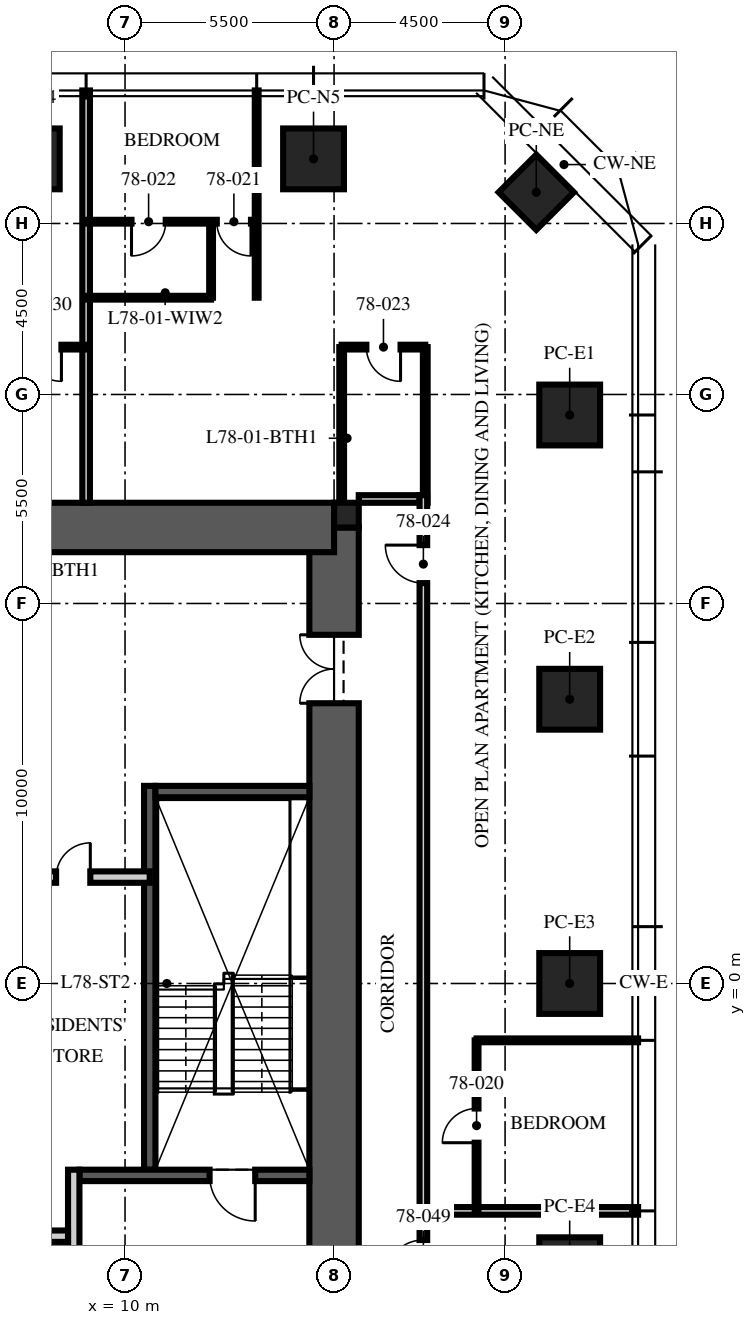
"""IFC4 building model, lengths in metres.
Left out: names, types, materials, properties, quantities, classifications, styles, units other than length and angle.
Written with IfcOpenShell. Run it as: python <this file> out.ifc"""

import sys

from ifc_helpers import new_model, si_unit, direction, frame, frame_2d, origin, origin_2d, place, context, subcontext, project, spatial, rectangle, extrude, element, fill, save


model = new_model("IFC4")
c1 = context("Model", 3, precision=1e-05, world=origin(), true_north=direction((0.0, 1.0)))
c2 = subcontext(c1, "Body", "Model", "MODEL_VIEW")
j1 = project(units=[si_unit("LENGTHUNIT", "METRE"), si_unit("PLANEANGLEUNIT", "RADIAN")], contexts=[c1])
p1 = place(None, origin())
s1 = spatial("IfcSite", under=j1, at=p1, CompositionType="ELEMENT")
p2 = place(p1, origin())
s2 = spatial("IfcBuilding", under=s1, at=p2, CompositionType="ELEMENT")
p3 = place(p2, frame((0.0, 0.0, 312.0)))
s3 = spatial("IfcBuildingStorey", under=s2, at=p3, CompositionType="ELEMENT", Elevation=312.0)
p4 = place(p3, frame((15.5, -12.0, -0.25), z_axis=(0.0, 0.0, 1.0), x_axis=(0.0, 1.0, 0.0)))
e1 = element("IfcWall", 1, at=p4, inside=s3, PredefinedType="SHEAR", context=c2, shape_type="SweptSolid", body=[
    extrude(rectangle(XDim=24.0, YDim=1.3, at=frame_2d((12.0, 0.0))), origin(), (0.0, 0.0, 1.0), 3.75),
])
p5 = place(p4, frame((3.125, 0.0, 0.25)))
e2 = element("IfcOpeningElement", 2, at=p5, cuts=e1, PredefinedType="OPENING", context=c2, shape_type="SweptSolid", body=[
    extrude(rectangle(XDim=1.2, YDim=2.1, at=frame_2d((0.6, 1.05))), frame((0.0, 0.66, 0.0), z_axis=(0.0, -1.0, 0.0), x_axis=(1.0, 0.0, 0.0)), (0.0, 0.0, 1.0), 1.32),
])
p6 = place(p4, frame((19.375, 0.0, 0.25)))
e3 = element("IfcOpeningElement", 3, at=p6, cuts=e1, PredefinedType="OPENING", context=c2, shape_type="SweptSolid", body=[
    extrude(rectangle(XDim=1.8, YDim=2.1, at=frame_2d((0.9, 1.05))), frame((0.0, 0.66, 0.0), z_axis=(0.0, -1.0, 0.0), x_axis=(1.0, 0.0, 0.0)), (0.0, 0.0, 1.0), 1.32),
])
p7 = place(p3, frame((-15.5, 12.0, -0.25), z_axis=(0.0, 0.0, 1.0), x_axis=(1.0, 0.0, 0.0)))
e4 = element("IfcWall", 4, at=p7, inside=s3, PredefinedType="SHEAR", context=c2, shape_type="SweptSolid", body=[
    extrude(rectangle(XDim=31.0, YDim=1.3, at=frame_2d((15.5, 0.0))), origin(), (0.0, 0.0, 1.0), 3.75),
])
p8 = place(p3, frame((15.825, 12.325, -0.25), z_axis=(0.0, 0.0, 1.0), x_axis=(1.0, 0.0, 0.0)))
e5 = element("IfcColumn", 5, at=p8, inside=s3, PredefinedType="COLUMN", context=c2, shape_type="SweptSolid", body=[
    extrude(rectangle(XDim=0.65, YDim=0.65, at=origin_2d()), origin(), (0.0, 0.0, 1.0), 3.75),
])
for number, where, z_axis, x_axis in (
    (6, (7.48, 21.7, 0.0), (0.0, 0.0, 1.0), (1.0, 0.0, 0.0)),
    (7, (14.96, 21.7, 0.0), (0.0, 0.0, 1.0), (1.0, 0.0, 0.0)),
    (8, (21.7, 14.96, 0.0), (0.0, 0.0, 1.0), (0.0, 1.0, 0.0)),
    (9, (21.7, 7.48, 0.0), (0.0, 0.0, 1.0), (0.0, 1.0, 0.0)),
    (10, (21.7, 0.0, 0.0), (0.0, 0.0, 1.0), (0.0, 1.0, 0.0)),
    (11, (21.7, -7.48, 0.0), (0.0, 0.0, 1.0), (0.0, 1.0, 0.0)),
):
    element("IfcColumn", number, at=place(p3, frame(where, z_axis=z_axis, x_axis=x_axis)), inside=s3, PredefinedType="COLUMN", context=c2, shape_type="SweptSolid", body=[
        extrude(rectangle(XDim=1.6, YDim=1.6, at=origin_2d()), origin(), (0.0, 0.0, 1.0), 3.75),
    ])
p9 = place(p3, frame((20.821, 20.821, 0.0), z_axis=(0.0, 0.0, 1.0), x_axis=(0.707106781187, -0.707106781187, 0.0)))
e12 = element("IfcColumn", 12, at=p9, inside=s3, PredefinedType="COLUMN", context=c2, shape_type="SweptSolid", body=[
    extrude(rectangle(XDim=1.4, YDim=1.4, at=origin_2d()), origin(), (0.0, 0.0, 1.0), 3.75),
])
p10 = place(p3, frame((10.65, -4.9, 0.0), z_axis=(0.0, 0.0, 1.0), x_axis=(0.0, 1.0, 0.0)))
e13 = element("IfcWall", 13, at=p10, inside=s3, PredefinedType="SOLIDWALL", context=c2, shape_type="SweptSolid", body=[
    extrude(rectangle(XDim=10.1, YDim=0.3, at=frame_2d((5.05, 0.0))), origin(), (0.0, 0.0, 1.0), 3.5),
])
p11 = place(p3, frame((14.85, -5.05, 0.0), z_axis=(0.0, 0.0, 1.0), x_axis=(-1.0, 0.0, 0.0)))
e14 = element("IfcWall", 14, at=p11, inside=s3, PredefinedType="SOLIDWALL", context=c2, shape_type="SweptSolid", body=[
    extrude(rectangle(XDim=6.05, YDim=0.3, at=frame_2d((3.025, 0.0))), origin(), (0.0, 0.0, 1.0), 3.5),
])
p12 = place(p11, frame((1.425, 0.0, 0.0)))
e15 = element("IfcOpeningElement", 15, at=p12, cuts=e14, PredefinedType="OPENING", context=c2, shape_type="SweptSolid", body=[
    extrude(rectangle(XDim=1.2, YDim=2.1, at=frame_2d((0.6, 1.05))), frame((0.0, 0.16, 0.0), z_axis=(0.0, -1.0, 0.0), x_axis=(1.0, 0.0, 0.0)), (0.0, 0.0, 1.0), 0.32),
])
p13 = place(p3, frame((14.85, 5.05, 0.0), z_axis=(0.0, 0.0, 1.0), x_axis=(-1.0, 0.0, 0.0)))
e16 = element("IfcWall", 16, at=p13, inside=s3, PredefinedType="SOLIDWALL", context=c2, shape_type="SweptSolid", body=[
    extrude(rectangle(XDim=4.05, YDim=0.3, at=frame_2d((2.025, 0.0))), origin(), (0.0, 0.0, 1.0), 3.5),
])
p14 = place(p3, frame((8.65, -11.35, 0.0), z_axis=(0.0, 0.0, 1.0), x_axis=(0.0, 1.0, 0.0)))
e17 = element("IfcWall", 17, at=p14, inside=s3, PredefinedType="PARTITIONING", context=c2, shape_type="SweptSolid", body=[
    extrude(rectangle(XDim=6.45, YDim=0.3, at=frame_2d((3.225, 0.0))), origin(), (0.0, 0.0, 1.0), 3.5),
])
p15 = place(p14, frame((2.6, 0.0, 0.0)))
e18 = element("IfcOpeningElement", 18, at=p15, cuts=e17, PredefinedType="OPENING", context=c2, shape_type="SweptSolid", body=[
    extrude(rectangle(XDim=1.1, YDim=2.1, at=frame_2d((0.55, 1.05))), frame((0.0, 0.16, 0.0), z_axis=(0.0, -1.0, 0.0), x_axis=(1.0, 0.0, 0.0)), (0.0, 0.0, 1.0), 0.32),
])
p16 = place(p3, frame((-8.5, -6.65, 0.0), z_axis=(0.0, 0.0, 1.0), x_axis=(1.0, 0.0, 0.0)))
e19 = element("IfcWall", 19, at=p16, inside=s3, PredefinedType="PARTITIONING", context=c2, shape_type="SweptSolid", body=[
    extrude(rectangle(XDim=17.0, YDim=0.3, at=frame_2d((8.5, 0.0))), origin(), (0.0, 0.0, 1.0), 3.5),
])
p17 = place(p16, frame((7.8, 0.0, 0.0)))
e20 = element("IfcOpeningElement", 20, at=p17, cuts=e19, PredefinedType="OPENING", context=c2, shape_type="SweptSolid", body=[
    extrude(rectangle(XDim=1.3, YDim=2.4, at=frame_2d((0.65, 1.2))), frame((0.0, 0.16, 0.0), z_axis=(0.0, -1.0, 0.0), x_axis=(1.0, 0.0, 0.0)), (0.0, 0.0, 1.0), 0.32),
])
p18 = place(p16, frame((5.65, 0.0, 0.0)))
e21 = element("IfcOpeningElement", 21, at=p18, cuts=e19, PredefinedType="OPENING", context=c2, shape_type="SweptSolid", body=[
    extrude(rectangle(XDim=0.9, YDim=2.1, at=frame_2d((0.45, 1.05))), frame((0.0, 0.16, 0.0), z_axis=(0.0, -1.0, 0.0), x_axis=(1.0, 0.0, 0.0)), (0.0, 0.0, 1.0), 0.32),
])
p19 = place(p16, frame((10.4, 0.0, 0.0)))
e22 = element("IfcOpeningElement", 22, at=p19, cuts=e19, PredefinedType="OPENING", context=c2, shape_type="SweptSolid", body=[
    extrude(rectangle(XDim=0.9, YDim=2.1, at=frame_2d((0.45, 1.05))), frame((0.0, 0.16, 0.0), z_axis=(0.0, -1.0, 0.0), x_axis=(1.0, 0.0, 0.0)), (0.0, 0.0, 1.0), 0.32),
])
p20 = place(p3, frame((-10.65, 2.8, 0.0), z_axis=(0.0, 0.0, 1.0), x_axis=(1.0, 0.0, 0.0)))
e23 = element("IfcWall", 23, at=p20, inside=s3, PredefinedType="PARTITIONING", context=c2, shape_type="SweptSolid", body=[
    extrude(rectangle(XDim=21.3, YDim=0.3, at=frame_2d((10.65, 0.0))), origin(), (0.0, 0.0, 1.0), 3.5),
])
p21 = place(p20, frame((10.05, 0.0, 0.0)))
e24 = element("IfcOpeningElement", 24, at=p21, cuts=e23, PredefinedType="OPENING", context=c2, shape_type="SweptSolid", body=[
    extrude(rectangle(XDim=1.2, YDim=2.1, at=frame_2d((0.6, 1.05))), frame((0.0, 0.16, 0.0), z_axis=(0.0, -1.0, 0.0), x_axis=(1.0, 0.0, 0.0)), (0.0, 0.0, 1.0), 0.32),
])
p22 = place(p20, frame((1.493, 0.0, 0.0)))
e25 = element("IfcOpeningElement", 25, at=p22, cuts=e23, PredefinedType="OPENING", context=c2, shape_type="SweptSolid", body=[
    extrude(rectangle(XDim=0.9, YDim=2.1, at=frame_2d((0.45, 1.05))), frame((0.0, 0.16, 0.0), z_axis=(0.0, -1.0, 0.0), x_axis=(1.0, 0.0, 0.0)), (0.0, 0.0, 1.0), 0.32),
])
p23 = place(p20, frame((18.836, 0.0, 0.0)))
e26 = element("IfcOpeningElement", 26, at=p23, cuts=e23, PredefinedType="OPENING", context=c2, shape_type="SweptSolid", body=[
    extrude(rectangle(XDim=0.9, YDim=2.1, at=frame_2d((0.45, 1.05))), frame((0.0, 0.16, 0.0), z_axis=(0.0, -1.0, 0.0), x_axis=(1.0, 0.0, 0.0)), (0.0, 0.0, 1.0), 0.32),
])
p24 = place(p3, frame((16.15, 12.75, 0.0), z_axis=(0.0, 0.0, 1.0), x_axis=(1.0, 0.0, 0.0)))
e27 = element("IfcWall", 27, at=p24, inside=s3, PredefinedType="PARTITIONING", context=c2, shape_type="SweptSolid", body=[
    extrude(rectangle(XDim=1.6, YDim=0.2, at=frame_2d((0.8, 0.0))), origin(), (0.0, 0.0, 1.0), 2.6),
])
p25 = place(p3, frame((17.95, -5.984, 0.0), z_axis=(0.0, 0.0, 1.0), x_axis=(1.0, 0.0, 0.0)))
e28 = element("IfcWall", 28, at=p25, inside=s3, PredefinedType="PARTITIONING", context=c2, shape_type="SweptSolid", body=[
    extrude(rectangle(XDim=5.55, YDim=0.2, at=frame_2d((2.775, 0.0))), origin(), (0.0, 0.0, 1.0), 3.01),
])
p26 = place(p3, frame((19.25, -1.496, 0.0), z_axis=(0.0, 0.0, 1.0), x_axis=(1.0, 0.0, 0.0)))
e29 = element("IfcWall", 29, at=p26, inside=s3, PredefinedType="PARTITIONING", context=c2, shape_type="SweptSolid", body=[
    extrude(rectangle(XDim=4.25, YDim=0.1, at=frame_2d((2.125, 0.0))), origin(), (0.0, 0.0, 1.0), 3.01),
])
p27 = place(p3, frame((13.464, 18.046, 0.0), z_axis=(0.0, 0.0, 1.0), x_axis=(0.0, 1.0, 0.0)))
e30 = element("IfcWall", 30, at=p27, inside=s3, PredefinedType="PARTITIONING", context=c2, shape_type="SweptSolid", body=[
    extrude(rectangle(XDim=5.454, YDim=0.1, at=frame_2d((2.727, 0.0))), origin(), (0.0, 0.0, 1.0), 3.01),
])
p28 = place(p3, frame((8.976, 12.65, 0.0), z_axis=(0.0, 0.0, 1.0), x_axis=(0.0, 1.0, 0.0)))
e31 = element("IfcWall", 31, at=p28, inside=s3, PredefinedType="PARTITIONING", context=c2, shape_type="SweptSolid", body=[
    extrude(rectangle(XDim=10.85, YDim=0.2, at=frame_2d((5.425, 0.0))), origin(), (0.0, 0.0, 1.0), 3.01),
])
p29 = place(p3, frame((19.25, -5.984, 0.0), z_axis=(0.0, 0.0, 1.0), x_axis=(0.0, 1.0, 0.0)))
e32 = element("IfcWall", 32, at=p29, inside=s3, PredefinedType="PARTITIONING", context=c2, shape_type="SweptSolid", body=[
    extrude(rectangle(XDim=4.488, YDim=0.1, at=frame_2d((2.244, 0.0))), origin(), (0.0, 0.0, 1.0), 2.91),
])
p30 = place(p29, frame((1.794, 0.0, 0.0)))
e33 = element("IfcOpeningElement", 33, at=p30, cuts=e32, PredefinedType="OPENING", context=c2, shape_type="SweptSolid", body=[
    extrude(rectangle(XDim=0.9, YDim=2.1, at=frame_2d((0.45, 1.05))), frame((0.0, 0.06, 0.0), z_axis=(0.0, -1.0, 0.0), x_axis=(1.0, 0.0, 0.0)), (0.0, 0.0, 1.0), 0.12),
])
p31 = place(p3, frame((13.464, 20.046, 0.0), z_axis=(0.0, 0.0, 1.0), x_axis=(-1.0, 0.0, 0.0)))
e34 = element("IfcWall", 34, at=p31, inside=s3, PredefinedType="PARTITIONING", context=c2, shape_type="SweptSolid", body=[
    extrude(rectangle(XDim=4.488, YDim=0.1, at=frame_2d((2.244, 0.0))), origin(), (0.0, 0.0, 1.0), 2.91),
])
p32 = place(p31, frame((0.15, 0.0, 0.0)))
e35 = element("IfcOpeningElement", 35, at=p32, cuts=e34, PredefinedType="OPENING", context=c2, shape_type="SweptSolid", body=[
    extrude(rectangle(XDim=0.9, YDim=2.1, at=frame_2d((0.45, 1.05))), frame((0.0, 0.06, 0.0), z_axis=(0.0, -1.0, 0.0), x_axis=(1.0, 0.0, 0.0)), (0.0, 0.0, 1.0), 0.12),
])
p33 = place(p31, frame((2.394, 0.0, 0.0)))
e36 = element("IfcOpeningElement", 36, at=p33, cuts=e34, PredefinedType="OPENING", context=c2, shape_type="SweptSolid", body=[
    extrude(rectangle(XDim=0.9, YDim=2.1, at=frame_2d((0.45, 1.05))), frame((0.0, 0.06, 0.0), z_axis=(0.0, -1.0, 0.0), x_axis=(1.0, 0.0, 0.0)), (0.0, 0.0, 1.0), 0.12),
])
p34 = place(p3, frame((12.264, 18.046, 0.0), z_axis=(0.0, 0.0, 1.0), x_axis=(0.0, 1.0, 0.0)))
e37 = element("IfcWall", 37, at=p34, inside=s3, PredefinedType="PARTITIONING", context=c2, shape_type="SweptSolid", body=[
    extrude(rectangle(XDim=2.0, YDim=0.1, at=frame_2d((1.0, 0.0))), origin(), (0.0, 0.0, 1.0), 3.5),
])
p35 = place(p3, frame((12.264, 18.046, 0.0), z_axis=(0.0, 0.0, 1.0), x_axis=(-1.0, 0.0, 0.0)))
e38 = element("IfcWall", 38, at=p35, inside=s3, PredefinedType="PARTITIONING", context=c2, shape_type="SweptSolid", body=[
    extrude(rectangle(XDim=3.288, YDim=0.1, at=frame_2d((1.644, 0.0))), origin(), (0.0, 0.0, 1.0), 2.91),
])
p36 = place(p3, frame((17.9, 16.746, 0.0), z_axis=(0.0, 0.0, 1.0), x_axis=(-1.0, 0.0, 0.0)))
e39 = element("IfcWall", 39, at=p36, inside=s3, PredefinedType="PARTITIONING", context=c2, shape_type="SweptSolid", body=[
    extrude(rectangle(XDim=2.2, YDim=0.125, at=frame_2d((1.1, 0.0))), origin(), (0.0, 0.0, 1.0), 2.91),
])
p37 = place(p36, frame((0.65, 0.0, 0.0)))
e40 = element("IfcOpeningElement", 40, at=p37, cuts=e39, PredefinedType="OPENING", context=c2, shape_type="SweptSolid", body=[
    extrude(rectangle(XDim=0.9, YDim=2.1, at=frame_2d((0.45, 1.05))), frame((0.0, 0.073, 0.0), z_axis=(0.0, -1.0, 0.0), x_axis=(1.0, 0.0, 0.0)), (0.0, 0.0, 1.0), 0.145),
])
for number, where, z_axis, x_axis in (
    (41, (17.9, 12.65, 0.0), (0.0, 0.0, 1.0), (0.0, 1.0, 0.0)),
    (42, (15.7, 12.65, 0.0), (0.0, 0.0, 1.0), (0.0, 1.0, 0.0)),
):
    element("IfcWall", number, at=place(p3, frame(where, z_axis=z_axis, x_axis=x_axis)), inside=s3, PredefinedType="PARTITIONING", context=c2, shape_type="SweptSolid", body=[
        extrude(rectangle(XDim=4.096, YDim=0.125, at=frame_2d((2.048, 0.0))), origin(), (0.0, 0.0, 1.0), 2.6),
    ])
p38 = place(p3, frame((8.976, 16.746, 0.0), z_axis=(0.0, 0.0, 1.0), x_axis=(-1.0, 0.0, 0.0)))
e43 = element("IfcWall", 43, at=p38, inside=s3, PredefinedType="PARTITIONING", context=c2, shape_type="SweptSolid", body=[
    extrude(rectangle(XDim=7.7, YDim=0.125, at=frame_2d((3.85, 0.0))), origin(), (0.0, 0.0, 1.0), 2.9),
])
p39 = place(p38, frame((0.65, 0.0, 0.0)))
e44 = element("IfcOpeningElement", 44, at=p39, cuts=e43, PredefinedType="OPENING", context=c2, shape_type="SweptSolid", body=[
    extrude(rectangle(XDim=0.9, YDim=2.1, at=frame_2d((0.45, 1.05))), frame((0.0, 0.073, 0.0), z_axis=(0.0, -1.0, 0.0), x_axis=(1.0, 0.0, 0.0)), (0.0, 0.0, 1.0), 0.145),
])
p40 = place(p38, frame((2.85, 0.0, 0.0)))
e45 = element("IfcOpeningElement", 45, at=p40, cuts=e43, PredefinedType="OPENING", context=c2, shape_type="SweptSolid", body=[
    extrude(rectangle(XDim=0.9, YDim=2.1, at=frame_2d((0.45, 1.05))), frame((0.0, 0.073, 0.0), z_axis=(0.0, -1.0, 0.0), x_axis=(1.0, 0.0, 0.0)), (0.0, 0.0, 1.0), 0.145),
])
p41 = place(p38, frame((4.85, 0.0, 0.0)))
e46 = element("IfcOpeningElement", 46, at=p41, cuts=e43, PredefinedType="OPENING", context=c2, shape_type="SweptSolid", body=[
    extrude(rectangle(XDim=0.9, YDim=2.1, at=frame_2d((0.45, 1.05))), frame((0.0, 0.073, 0.0), z_axis=(0.0, -1.0, 0.0), x_axis=(1.0, 0.0, 0.0)), (0.0, 0.0, 1.0), 0.145),
])
p42 = place(p38, frame((6.5, 0.0, 0.0)))
e47 = element("IfcOpeningElement", 47, at=p42, cuts=e43, PredefinedType="OPENING", context=c2, shape_type="SweptSolid", body=[
    extrude(rectangle(XDim=0.9, YDim=2.1, at=frame_2d((0.45, 1.05))), frame((0.0, 0.073, 0.0), z_axis=(0.0, -1.0, 0.0), x_axis=(1.0, 0.0, 0.0)), (0.0, 0.0, 1.0), 0.145),
])
p43 = place(p3, frame((17.85, -12.85, 0.0), z_axis=(0.0, 0.0, 1.0), x_axis=(0.0, 1.0, 0.0)))
e48 = element("IfcWall", 48, at=p43, inside=s3, PredefinedType="PARTITIONING", context=c2, shape_type="SweptSolid", body=[
    extrude(rectangle(XDim=25.7, YDim=0.2, at=frame_2d((12.85, 0.0))), origin(), (0.0, 0.0, 1.0), 2.9),
])
p44 = place(p43, frame((23.386, 0.0, 0.0)))
e49 = element("IfcOpeningElement", 49, at=p44, cuts=e48, PredefinedType="OPENING", context=c2, shape_type="SweptSolid", body=[
    extrude(rectangle(XDim=1.0, YDim=2.2, at=frame_2d((0.5, 1.1))), frame((0.0, 0.11, 0.0), z_axis=(0.0, -1.0, 0.0), x_axis=(1.0, 0.0, 0.0)), (0.0, 0.0, 1.0), 0.22),
])
p45 = place(p43, frame((5.1, 0.0, 0.0)))
e50 = element("IfcOpeningElement", 50, at=p45, cuts=e48, PredefinedType="OPENING", context=c2, shape_type="SweptSolid", body=[
    extrude(rectangle(XDim=1.0, YDim=2.2, at=frame_2d((0.5, 1.1))), frame((0.0, 0.11, 0.0), z_axis=(0.0, -1.0, 0.0), x_axis=(1.0, 0.0, 0.0)), (0.0, 0.0, 1.0), 0.22),
])
p46 = place(p12, origin())
e51 = element("IfcDoor", 51, at=p46, inside=s3, OperationType="SINGLE_SWING_LEFT", PredefinedType="DOOR", context=c2, shape_type="SweptSolid", body=[
    extrude(rectangle(XDim=1.2, YDim=2.1, at=frame_2d((0.6, 1.05))), frame((0.0, 0.025, 0.0), z_axis=(0.0, -1.0, 0.0), x_axis=(1.0, 0.0, 0.0)), (0.0, 0.0, 1.0), 0.05),
])
fill(e15, e51)
p47 = place(p6, origin())
e52 = element("IfcDoor", 52, at=p47, inside=s3, OperationType="DOUBLE_DOOR_SINGLE_SWING", PredefinedType="DOOR", context=c2, shape_type="SweptSolid", body=[
    extrude(rectangle(XDim=1.8, YDim=2.1, at=frame_2d((0.9, 1.05))), frame((0.0, 0.025, 0.0), z_axis=(0.0, -1.0, 0.0), x_axis=(1.0, 0.0, 0.0)), (0.0, 0.0, 1.0), 0.05),
])
fill(e3, e52)
p48 = place(p23, origin())
e53 = element("IfcDoor", 53, at=p48, inside=s3, OperationType="SINGLE_SWING_RIGHT", PredefinedType="DOOR", context=c2, shape_type="SweptSolid", body=[
    extrude(rectangle(XDim=0.9, YDim=2.1, at=frame_2d((0.45, 1.05))), frame((0.0, 0.025, 0.0), z_axis=(0.0, -1.0, 0.0), x_axis=(1.0, 0.0, 0.0)), (0.0, 0.0, 1.0), 0.05),
])
fill(e26, e53)
p49 = place(p30, origin())
e54 = element("IfcDoor", 54, at=p49, inside=s3, OperationType="SINGLE_SWING_LEFT", PredefinedType="DOOR", context=c2, shape_type="SweptSolid", body=[
    extrude(rectangle(XDim=0.9, YDim=2.1, at=frame_2d((0.45, 1.05))), frame((0.0, 0.025, 0.0), z_axis=(0.0, -1.0, 0.0), x_axis=(1.0, 0.0, 0.0)), (0.0, 0.0, 1.0), 0.05),
])
fill(e33, e54)
p50 = place(p32, origin())
e55 = element("IfcDoor", 55, at=p50, inside=s3, OperationType="SINGLE_SWING_LEFT", PredefinedType="DOOR", context=c2, shape_type="SweptSolid", body=[
    extrude(rectangle(XDim=0.9, YDim=2.1, at=frame_2d((0.45, 1.05))), frame((0.0, 0.025, 0.0), z_axis=(0.0, -1.0, 0.0), x_axis=(1.0, 0.0, 0.0)), (0.0, 0.0, 1.0), 0.05),
])
fill(e35, e55)
p51 = place(p33, origin())
e56 = element("IfcDoor", 56, at=p51, inside=s3, OperationType="SINGLE_SWING_RIGHT", PredefinedType="DOOR", context=c2, shape_type="SweptSolid", body=[
    extrude(rectangle(XDim=0.9, YDim=2.1, at=frame_2d((0.45, 1.05))), frame((0.0, 0.025, 0.0), z_axis=(0.0, -1.0, 0.0), x_axis=(1.0, 0.0, 0.0)), (0.0, 0.0, 1.0), 0.05),
])
fill(e36, e56)
p52 = place(p37, origin())
e57 = element("IfcDoor", 57, at=p52, inside=s3, OperationType="SINGLE_SWING_LEFT", PredefinedType="DOOR", context=c2, shape_type="SweptSolid", body=[
    extrude(rectangle(XDim=0.9, YDim=2.1, at=frame_2d((0.45, 1.05))), frame((0.0, 0.025, 0.0), z_axis=(0.0, -1.0, 0.0), x_axis=(1.0, 0.0, 0.0)), (0.0, 0.0, 1.0), 0.05),
])
fill(e40, e57)
p53 = place(p44, origin())
e58 = element("IfcDoor", 58, at=p53, inside=s3, OperationType="SINGLE_SWING_RIGHT", PredefinedType="DOOR", context=c2, shape_type="SweptSolid", body=[
    extrude(rectangle(XDim=1.0, YDim=2.2, at=frame_2d((0.5, 1.1))), frame((0.0, 0.025, 0.0), z_axis=(0.0, -1.0, 0.0), x_axis=(1.0, 0.0, 0.0)), (0.0, 0.0, 1.0), 0.05),
])
fill(e49, e58)
p54 = place(p39, origin())
e59 = element("IfcDoor", 59, at=p54, inside=s3, OperationType="SINGLE_SWING_LEFT", PredefinedType="DOOR", context=c2, shape_type="SweptSolid", body=[
    extrude(rectangle(XDim=0.9, YDim=2.1, at=frame_2d((0.45, 1.05))), frame((0.0, 0.025, 0.0), z_axis=(0.0, -1.0, 0.0), x_axis=(1.0, 0.0, 0.0)), (0.0, 0.0, 1.0), 0.05),
])
fill(e44, e59)
p55 = place(p45, origin())
e60 = element("IfcDoor", 60, at=p55, inside=s3, OperationType="SINGLE_SWING_LEFT", PredefinedType="DOOR", context=c2, shape_type="SweptSolid", body=[
    extrude(rectangle(XDim=1.0, YDim=2.2, at=frame_2d((0.5, 1.1))), frame((0.0, 0.025, 0.0), z_axis=(0.0, -1.0, 0.0), x_axis=(1.0, 0.0, 0.0)), (0.0, 0.0, 1.0), 0.05),
])
fill(e50, e60)
save(model, sys.argv[1])
